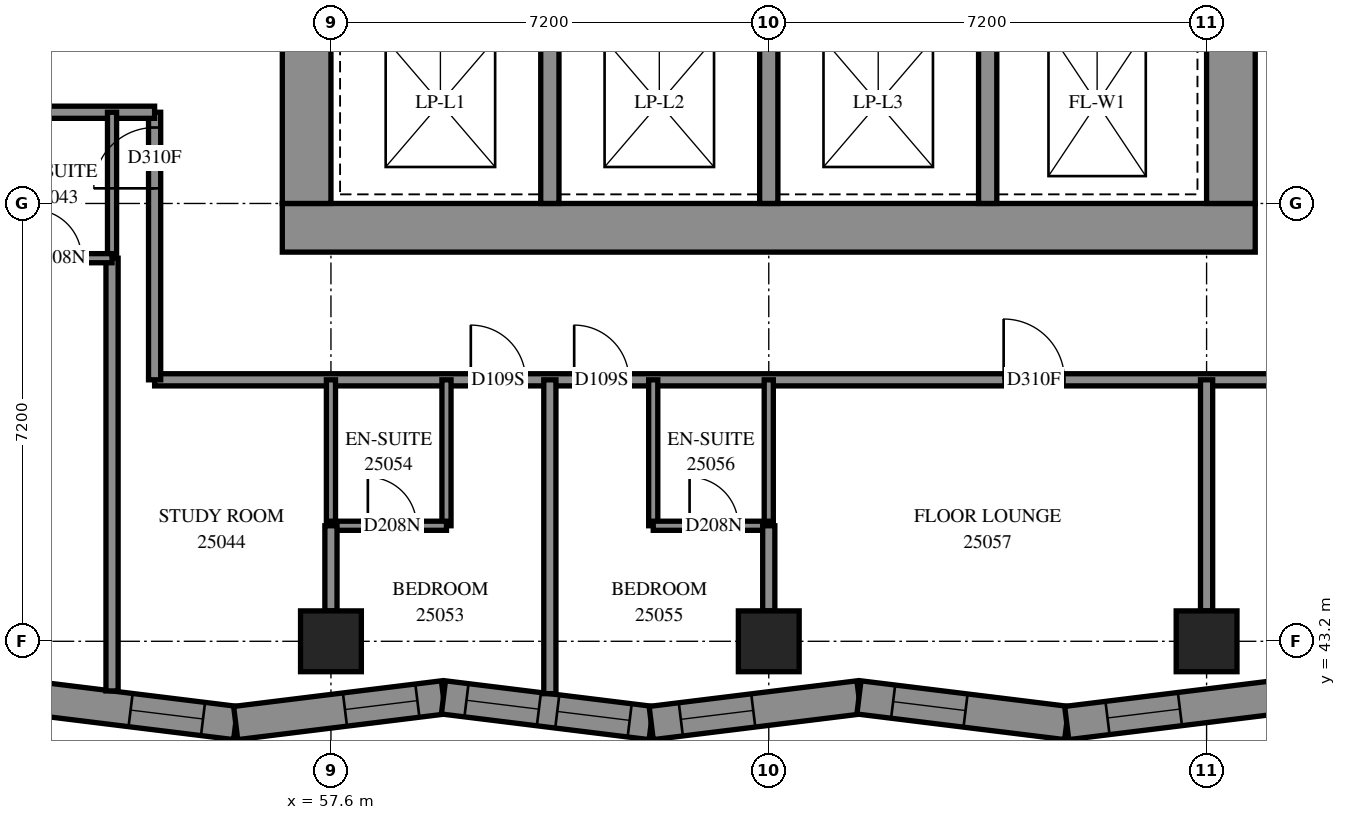
"""IFC4 building model, lengths in metres.
Left out: names, types, materials, properties, quantities, classifications, styles, units other than length and angle.
Written with IfcOpenShell. Run it as: python <this file> out.ifc"""

import sys

from ifc_helpers import new_model, si_unit, direction, frame, frame_2d, origin, origin_2d, place, context, subcontext, project, spatial, polyline, rectangle, outline, extrude, element, fill, save


model = new_model("IFC4")
c1 = context("Model", 3, precision=1e-05, world=origin(), true_north=direction((0.0, 1.0)))
c2 = subcontext(c1, "Body", "Model", "MODEL_VIEW")
j1 = project(units=[si_unit("LENGTHUNIT", "METRE"), si_unit("PLANEANGLEUNIT", "RADIAN")], contexts=[c1])
p1 = place(None, origin())
s1 = spatial("IfcSite", under=j1, at=p1, CompositionType="ELEMENT")
p2 = place(p1, origin())
s2 = spatial("IfcBuilding", under=s1, at=p2, CompositionType="ELEMENT")
p3 = place(p2, frame((0.0, 0.0, 94.8)))
s3 = spatial("IfcBuildingStorey", under=s2, at=p3, CompositionType="ELEMENT", Elevation=94.8)
for number, where, z_axis, x_axis in (
    (1, (57.6, 43.2, 0.0), (0.0, 0.0, 1.0), (1.0, 0.0, 0.0)),
    (2, (64.8, 43.2, 0.0), (0.0, 0.0, 1.0), (1.0, 0.0, 0.0)),
    (3, (72.0, 43.2, 0.0), (0.0, 0.0, 1.0), (1.0, 0.0, 0.0)),
):
    element("IfcColumn", number, at=place(p3, frame(where, z_axis=z_axis, x_axis=x_axis)), inside=s3, PredefinedType="COLUMN", context=c2, shape_type="SweptSolid", body=[
        extrude(rectangle(XDim=1.0, YDim=1.0, at=origin_2d()), origin(), (0.0, 0.0, 1.0), 3.1),
    ])
p4 = place(p3, frame((56.8, 50.0, -0.3), z_axis=(0.0, 0.0, 1.0), x_axis=(1.0, 0.0, 0.0)))
e4 = element("IfcWall", 4, at=p4, inside=s3, PredefinedType="SHEAR", context=c2, shape_type="SweptSolid", body=[
    extrude(rectangle(XDim=16.0, YDim=0.8, at=frame_2d((8.0, 0.0))), origin(), (0.0, 0.0, 1.0), 2.7),
])
p5 = place(p3, frame((57.2, 50.4, -0.3), z_axis=(0.0, 0.0, 1.0), x_axis=(0.0, 1.0, 0.0)))
e5 = element("IfcWall", 5, at=p5, inside=s3, PredefinedType="SHEAR", context=c2, shape_type="SweptSolid", body=[
    extrude(rectangle(XDim=14.4, YDim=0.8, at=frame_2d((7.2, 0.0))), origin(), (0.0, 0.0, 1.0), 2.7),
])
p6 = place(p5, frame((4.55, 0.0, 0.3)))
e6 = element("IfcOpeningElement", 6, at=p6, cuts=e5, PredefinedType="OPENING", context=c2, shape_type="SweptSolid", body=[
    extrude(rectangle(XDim=1.1, YDim=2.1, at=frame_2d((0.55, 1.05))), frame((0.0, 0.41, 0.0), z_axis=(0.0, -1.0, 0.0), x_axis=(1.0, 0.0, 0.0)), (0.0, 0.0, 1.0), 0.82),
])
p7 = place(p5, frame((11.35, 0.0, 0.3)))
e7 = element("IfcOpeningElement", 7, at=p7, cuts=e5, PredefinedType="OPENING", context=c2, shape_type="SweptSolid", body=[
    extrude(rectangle(XDim=1.1, YDim=2.1, at=frame_2d((0.55, 1.05))), frame((0.0, 0.41, 0.0), z_axis=(0.0, -1.0, 0.0), x_axis=(1.0, 0.0, 0.0)), (0.0, 0.0, 1.0), 0.82),
])
p8 = place(p3, frame((72.4, 50.4, -0.3), z_axis=(0.0, 0.0, 1.0), x_axis=(0.0, 1.0, 0.0)))
e8 = element("IfcWall", 8, at=p8, inside=s3, PredefinedType="SHEAR", context=c2, shape_type="SweptSolid", body=[
    extrude(rectangle(XDim=14.4, YDim=0.8, at=frame_2d((7.2, 0.0))), origin(), (0.0, 0.0, 1.0), 2.7),
])
p9 = place(p8, frame((4.55, 0.0, 0.3)))
e9 = element("IfcOpeningElement", 9, at=p9, cuts=e8, PredefinedType="OPENING", context=c2, shape_type="SweptSolid", body=[
    extrude(rectangle(XDim=1.1, YDim=2.1, at=frame_2d((0.55, 1.05))), frame((0.0, 0.41, 0.0), z_axis=(0.0, -1.0, 0.0), x_axis=(1.0, 0.0, 0.0)), (0.0, 0.0, 1.0), 0.82),
])
p10 = place(p8, frame((11.35, 0.0, 0.3)))
e10 = element("IfcOpeningElement", 10, at=p10, cuts=e8, PredefinedType="OPENING", context=c2, shape_type="SweptSolid", body=[
    extrude(rectangle(XDim=1.1, YDim=2.1, at=frame_2d((0.55, 1.05))), frame((0.0, 0.41, 0.0), z_axis=(0.0, -1.0, 0.0), x_axis=(1.0, 0.0, 0.0)), (0.0, 0.0, 1.0), 0.82),
])
for number, where, z_axis, x_axis in (
    (11, (61.2, 50.4, 0.0), (0.0, 0.0, 1.0), (0.0, 1.0, 0.0)),
    (12, (64.8, 50.4, 0.0), (0.0, 0.0, 1.0), (0.0, 1.0, 0.0)),
    (13, (68.4, 50.4, 0.0), (0.0, 0.0, 1.0), (0.0, 1.0, 0.0)),
):
    element("IfcWall", number, at=place(p3, frame(where, z_axis=z_axis, x_axis=x_axis)), inside=s3, PredefinedType="SOLIDWALL", context=c2, shape_type="SweptSolid", body=[
        extrude(rectangle(XDim=3.3, YDim=0.3, at=frame_2d((1.65, 0.0))), origin(), (0.0, 0.0, 1.0), 3.1),
    ])
p11 = place(p3, frame((52.593, 42.28, 0.0), z_axis=(0.0, 0.0, 1.0), x_axis=(0.9924934036, -0.1222981756, 0.0)))
e14 = element("IfcWall", 14, at=p11, inside=s3, PredefinedType="SOLIDWALL", context=c2, shape_type="SweptSolid", body=[
    extrude(outline(polyline([(0.058, -0.275), (3.5, -0.275), (3.432, 0.275), (-0.058, 0.275), (0.058, -0.275)])), origin(), (0.0, 0.0, 1.0), 3.1),
])
p12 = place(p11, frame((1.725, 0.0, 0.5)))
e15 = element("IfcOpeningElement", 15, at=p12, cuts=e14, PredefinedType="OPENING", context=c2, shape_type="SweptSolid", body=[
    extrude(rectangle(XDim=1.2, YDim=2.45, at=frame_2d((0.6, 1.225))), frame((0.0, 0.285, 0.0), z_axis=(0.0, -1.0, 0.0), x_axis=(1.0, 0.0, 0.0)), (0.0, 0.0, 1.0), 0.57),
])
p13 = place(p3, frame((56.033, 41.856, 0.0), z_axis=(0.0, 0.0, 1.0), x_axis=(0.9924939881, 0.122293432, 0.0)))
e16 = element("IfcWall", 16, at=p13, inside=s3, PredefinedType="SOLIDWALL", context=c2, shape_type="SweptSolid", body=[
    extrude(outline(polyline([(-0.034, -0.275), (3.409, -0.275), (3.476, 0.275), (0.034, 0.275), (-0.034, -0.275)])), origin(), (0.0, 0.0, 1.0), 3.1),
])
p14 = place(p13, frame((1.81, 0.0, 0.5)))
e17 = element("IfcOpeningElement", 17, at=p14, cuts=e16, PredefinedType="OPENING", context=c2, shape_type="SweptSolid", body=[
    extrude(rectangle(XDim=1.2, YDim=2.45, at=frame_2d((0.6, 1.225))), frame((0.0, 0.285, 0.0), z_axis=(0.0, -1.0, 0.0), x_axis=(1.0, 0.0, 0.0)), (0.0, 0.0, 1.0), 0.57),
])
p15 = place(p3, frame((59.45, 42.277, 0.0), z_axis=(0.0, 0.0, 1.0), x_axis=(0.9924935537, -0.1222969578, 0.0)))
e18 = element("IfcWall", 18, at=p15, inside=s3, PredefinedType="SOLIDWALL", context=c2, shape_type="SweptSolid", body=[
    extrude(outline(polyline([(0.034, -0.275), (3.476, -0.275), (3.409, 0.275), (-0.034, 0.275), (0.034, -0.275)])), origin(), (0.0, 0.0, 1.0), 3.1),
])
p16 = place(p15, frame((0.382, 0.0, 0.5)))
e19 = element("IfcOpeningElement", 19, at=p16, cuts=e18, PredefinedType="OPENING", context=c2, shape_type="SweptSolid", body=[
    extrude(rectangle(XDim=1.2, YDim=2.45, at=frame_2d((0.6, 1.225))), frame((0.0, 0.285, 0.0), z_axis=(0.0, -1.0, 0.0), x_axis=(1.0, 0.0, 0.0)), (0.0, 0.0, 1.0), 0.57),
])
p17 = place(p15, frame((1.886, 0.0, 0.5)))
e20 = element("IfcOpeningElement", 20, at=p17, cuts=e18, PredefinedType="OPENING", context=c2, shape_type="SweptSolid", body=[
    extrude(rectangle(XDim=1.2, YDim=2.45, at=frame_2d((0.6, 1.225))), frame((0.0, 0.285, 0.0), z_axis=(0.0, -1.0, 0.0), x_axis=(1.0, 0.0, 0.0)), (0.0, 0.0, 1.0), 0.57),
])
p18 = place(p3, frame((62.867, 41.856, 0.0), z_axis=(0.0, 0.0, 1.0), x_axis=(0.9924935537, 0.1222969578, 0.0)))
e21 = element("IfcWall", 21, at=p18, inside=s3, PredefinedType="SOLIDWALL", context=c2, shape_type="SweptSolid", body=[
    extrude(outline(polyline([(-0.034, -0.275), (3.409, -0.275), (3.476, 0.275), (0.034, 0.275), (-0.034, -0.275)])), origin(), (0.0, 0.0, 1.0), 3.1),
])
p19 = place(p18, frame((0.491, 0.0, 0.5)))
e22 = element("IfcOpeningElement", 22, at=p19, cuts=e21, PredefinedType="OPENING", context=c2, shape_type="SweptSolid", body=[
    extrude(rectangle(XDim=1.2, YDim=2.45, at=frame_2d((0.6, 1.225))), frame((0.0, 0.285, 0.0), z_axis=(0.0, -1.0, 0.0), x_axis=(1.0, 0.0, 0.0)), (0.0, 0.0, 1.0), 0.57),
])
p20 = place(p3, frame((66.283, 42.277, 0.0), z_axis=(0.0, 0.0, 1.0), x_axis=(0.9924935537, -0.1222969578, 0.0)))
e23 = element("IfcWall", 23, at=p20, inside=s3, PredefinedType="SOLIDWALL", context=c2, shape_type="SweptSolid", body=[
    extrude(outline(polyline([(0.034, -0.275), (3.476, -0.275), (3.409, 0.275), (-0.034, 0.275), (0.034, -0.275)])), origin(), (0.0, 0.0, 1.0), 3.1),
])
p21 = place(p20, frame((0.566, 0.0, 0.5)))
e24 = element("IfcOpeningElement", 24, at=p21, cuts=e23, PredefinedType="OPENING", context=c2, shape_type="SweptSolid", body=[
    extrude(rectangle(XDim=1.2, YDim=2.45, at=frame_2d((0.6, 1.225))), frame((0.0, 0.285, 0.0), z_axis=(0.0, -1.0, 0.0), x_axis=(1.0, 0.0, 0.0)), (0.0, 0.0, 1.0), 0.57),
])
p22 = place(p3, frame((69.7, 41.856, 0.0), z_axis=(0.0, 0.0, 1.0), x_axis=(0.9924938351, 0.1222946738, 0.0)))
e25 = element("IfcWall", 25, at=p22, inside=s3, PredefinedType="SOLIDWALL", context=c2, shape_type="SweptSolid", body=[
    extrude(outline(polyline([(-0.034, -0.275), (3.409, -0.275), (3.524, 0.275), (0.034, 0.275), (-0.034, -0.275)])), origin(), (0.0, 0.0, 1.0), 3.1),
])
p23 = place(p22, frame((0.676, 0.0, 0.5)))
e26 = element("IfcOpeningElement", 26, at=p23, cuts=e25, PredefinedType="OPENING", context=c2, shape_type="SweptSolid", body=[
    extrude(rectangle(XDim=1.2, YDim=2.45, at=frame_2d((0.6, 1.225))), frame((0.0, 0.285, 0.0), z_axis=(0.0, -1.0, 0.0), x_axis=(1.0, 0.0, 0.0)), (0.0, 0.0, 1.0), 0.57),
])
p24 = place(p3, frame((54.7, 47.5, 0.0), z_axis=(0.0, 0.0, 1.0), x_axis=(1.0, 0.0, 0.0)))
e27 = element("IfcWall", 27, at=p24, inside=s3, PredefinedType="PARTITIONING", context=c2, shape_type="SweptSolid", body=[
    extrude(rectangle(XDim=19.442, YDim=0.2, at=frame_2d((9.721, 0.0))), origin(), (0.0, 0.0, 1.0), 3.1),
])
p25 = place(p24, frame((5.2, 0.0, 0.0)))
e28 = element("IfcOpeningElement", 28, at=p25, cuts=e27, PredefinedType="OPENING", context=c2, shape_type="SweptSolid", body=[
    extrude(rectangle(XDim=0.9, YDim=2.1, at=frame_2d((0.45, 1.05))), frame((0.0, 0.11, 0.0), z_axis=(0.0, -1.0, 0.0), x_axis=(1.0, 0.0, 0.0)), (0.0, 0.0, 1.0), 0.22),
])
p26 = place(p24, frame((6.9, 0.0, 0.0)))
e29 = element("IfcOpeningElement", 29, at=p26, cuts=e27, PredefinedType="OPENING", context=c2, shape_type="SweptSolid", body=[
    extrude(rectangle(XDim=0.9, YDim=2.1, at=frame_2d((0.45, 1.05))), frame((0.0, 0.11, 0.0), z_axis=(0.0, -1.0, 0.0), x_axis=(1.0, 0.0, 0.0)), (0.0, 0.0, 1.0), 0.22),
])
p27 = place(p24, frame((13.963, 0.0, 0.0)))
e30 = element("IfcOpeningElement", 30, at=p27, cuts=e27, PredefinedType="OPENING", context=c2, shape_type="SweptSolid", body=[
    extrude(rectangle(XDim=1.0, YDim=2.1, at=frame_2d((0.5, 1.05))), frame((0.0, 0.11, 0.0), z_axis=(0.0, -1.0, 0.0), x_axis=(1.0, 0.0, 0.0)), (0.0, 0.0, 1.0), 0.22),
])
p28 = place(p3, frame((54.0, 42.384, 0.0), z_axis=(0.0, 0.0, 1.0), x_axis=(0.0, 1.0, 0.0)))
e31 = element("IfcWall", 31, at=p28, inside=s3, PredefinedType="PARTITIONING", context=c2, shape_type="SweptSolid", body=[
    extrude(rectangle(XDim=7.116, YDim=0.2, at=frame_2d((3.558, 0.0))), origin(), (0.0, 0.0, 1.0), 3.1),
])
p29 = place(p3, frame((61.2, 42.339, 0.0), z_axis=(0.0, 0.0, 1.0), x_axis=(0.0, 1.0, 0.0)))
e32 = element("IfcWall", 32, at=p29, inside=s3, PredefinedType="PARTITIONING", context=c2, shape_type="SweptSolid", body=[
    extrude(rectangle(XDim=5.162, YDim=0.2, at=frame_2d((2.581, 0.0))), origin(), (0.0, 0.0, 1.0), 3.1),
])
p30 = place(p3, frame((54.7, 47.5, 0.0), z_axis=(0.0, 0.0, 1.0), x_axis=(0.0, 1.0, 0.0)))
e33 = element("IfcWall", 33, at=p30, inside=s3, PredefinedType="PARTITIONING", context=c2, shape_type="SweptSolid", body=[
    extrude(rectangle(XDim=4.4, YDim=0.2, at=frame_2d((2.2, 0.0))), origin(), (0.0, 0.0, 1.0), 3.1),
])
p31 = place(p30, frame((3.149, 0.0, 0.0)))
e34 = element("IfcOpeningElement", 34, at=p31, cuts=e33, PredefinedType="OPENING", context=c2, shape_type="SweptSolid", body=[
    extrude(rectangle(XDim=1.0, YDim=2.1, at=frame_2d((0.5, 1.05))), frame((0.0, 0.11, 0.0), z_axis=(0.0, -1.0, 0.0), x_axis=(1.0, 0.0, 0.0)), (0.0, 0.0, 1.0), 0.22),
])
p32 = place(p3, frame((50.4, 51.9, 0.0), z_axis=(0.0, 0.0, 1.0), x_axis=(1.0, 0.0, 0.0)))
e35 = element("IfcWall", 35, at=p32, inside=s3, PredefinedType="PARTITIONING", context=c2, shape_type="SweptSolid", body=[
    extrude(rectangle(XDim=4.3, YDim=0.2, at=frame_2d((2.15, 0.0))), origin(), (0.0, 0.0, 1.0), 3.1),
])
p33 = place(p32, frame((0.552, 0.0, 0.0)))
e36 = element("IfcOpeningElement", 36, at=p33, cuts=e35, PredefinedType="OPENING", context=c2, shape_type="SweptSolid", body=[
    extrude(rectangle(XDim=0.9, YDim=2.1, at=frame_2d((0.45, 1.05))), frame((0.0, 0.11, 0.0), z_axis=(0.0, -1.0, 0.0), x_axis=(1.0, 0.0, 0.0)), (0.0, 0.0, 1.0), 0.22),
])
p34 = place(p3, frame((72.0, 43.7, 0.0), z_axis=(0.0, 0.0, 1.0), x_axis=(0.0, 1.0, 0.0)))
e37 = element("IfcWall", 37, at=p34, inside=s3, PredefinedType="PARTITIONING", context=c2, shape_type="SweptSolid", body=[
    extrude(rectangle(XDim=3.8, YDim=0.2, at=frame_2d((1.9, 0.0))), origin(), (0.0, 0.0, 1.0), 3.1),
])
for number, where, z_axis, x_axis in (
    (38, (54.0, 49.5, 0.0), (0.0, 0.0, 1.0), (0.0, 1.0, 0.0)),
    (39, (59.5, 45.1, 0.0), (0.0, 0.0, 1.0), (0.0, 1.0, 0.0)),
    (40, (57.6, 45.1, 0.0), (0.0, 0.0, 1.0), (0.0, 1.0, 0.0)),
    (41, (62.9, 45.1, 0.0), (0.0, 0.0, 1.0), (0.0, 1.0, 0.0)),
    (42, (64.8, 45.1, 0.0), (0.0, 0.0, 1.0), (0.0, 1.0, 0.0)),
):
    element("IfcWall", number, at=place(p3, frame(where, z_axis=z_axis, x_axis=x_axis)), inside=s3, PredefinedType="PARTITIONING", context=c2, shape_type="SweptSolid", body=[
        extrude(rectangle(XDim=2.4, YDim=0.15, at=frame_2d((1.2, 0.0))), origin(), (0.0, 0.0, 1.0), 3.1),
    ])
p35 = place(p3, frame((52.1, 49.5, 0.0), z_axis=(0.0, 0.0, 1.0), x_axis=(1.0, 0.0, 0.0)))
e43 = element("IfcWall", 43, at=p35, inside=s3, PredefinedType="PARTITIONING", context=c2, shape_type="SweptSolid", body=[
    extrude(rectangle(XDim=1.9, YDim=0.15, at=frame_2d((0.95, 0.0))), origin(), (0.0, 0.0, 1.0), 3.1),
])
p36 = place(p35, frame((0.598, 0.0, 0.0)))
e44 = element("IfcOpeningElement", 44, at=p36, cuts=e43, PredefinedType="OPENING", context=c2, shape_type="SweptSolid", body=[
    extrude(rectangle(XDim=0.8, YDim=2.1, at=frame_2d((0.4, 1.05))), frame((0.0, 0.085, 0.0), z_axis=(0.0, -1.0, 0.0), x_axis=(1.0, 0.0, 0.0)), (0.0, 0.0, 1.0), 0.17),
])
p37 = place(p3, frame((57.6, 45.1, 0.0), z_axis=(0.0, 0.0, 1.0), x_axis=(1.0, 0.0, 0.0)))
e45 = element("IfcWall", 45, at=p37, inside=s3, PredefinedType="PARTITIONING", context=c2, shape_type="SweptSolid", body=[
    extrude(rectangle(XDim=1.9, YDim=0.15, at=frame_2d((0.95, 0.0))), origin(), (0.0, 0.0, 1.0), 3.1),
])
p38 = place(p37, frame((0.607, 0.0, 0.0)))
e46 = element("IfcOpeningElement", 46, at=p38, cuts=e45, PredefinedType="OPENING", context=c2, shape_type="SweptSolid", body=[
    extrude(rectangle(XDim=0.8, YDim=2.1, at=frame_2d((0.4, 1.05))), frame((0.0, 0.085, 0.0), z_axis=(0.0, -1.0, 0.0), x_axis=(1.0, 0.0, 0.0)), (0.0, 0.0, 1.0), 0.17),
])
p39 = place(p3, frame((62.9, 45.1, 0.0), z_axis=(0.0, 0.0, 1.0), x_axis=(1.0, 0.0, 0.0)))
e47 = element("IfcWall", 47, at=p39, inside=s3, PredefinedType="PARTITIONING", context=c2, shape_type="SweptSolid", body=[
    extrude(rectangle(XDim=1.9, YDim=0.15, at=frame_2d((0.95, 0.0))), origin(), (0.0, 0.0, 1.0), 3.1),
])
p40 = place(p39, frame((0.598, 0.0, 0.0)))
e48 = element("IfcOpeningElement", 48, at=p40, cuts=e47, PredefinedType="OPENING", context=c2, shape_type="SweptSolid", body=[
    extrude(rectangle(XDim=0.8, YDim=2.1, at=frame_2d((0.4, 1.05))), frame((0.0, 0.085, 0.0), z_axis=(0.0, -1.0, 0.0), x_axis=(1.0, 0.0, 0.0)), (0.0, 0.0, 1.0), 0.17),
])
for number, where, z_axis, x_axis in (
    (49, (57.6, 43.7, 0.0), (0.0, 0.0, 1.0), (0.0, 1.0, 0.0)),
    (50, (64.8, 43.7, 0.0), (0.0, 0.0, 1.0), (0.0, 1.0, 0.0)),
):
    element("IfcWall", number, at=place(p3, frame(where, z_axis=z_axis, x_axis=x_axis)), inside=s3, PredefinedType="PARTITIONING", context=c2, shape_type="SweptSolid", body=[
        extrude(rectangle(XDim=1.4, YDim=0.2, at=frame_2d((0.7, 0.0))), origin(), (0.0, 0.0, 1.0), 3.1),
    ])
p41 = place(p12, origin())
e51 = element("IfcWindow", 51, at=p41, inside=s3, PartitioningType="SINGLE_PANEL", PredefinedType="WINDOW", context=c2, shape_type="SweptSolid", body=[
    extrude(rectangle(XDim=1.2, YDim=2.45, at=frame_2d((0.6, 1.225))), frame((0.0, 0.155, 0.0), z_axis=(0.0, -1.0, 0.0), x_axis=(1.0, 0.0, 0.0)), (0.0, 0.0, 1.0), 0.06),
])
fill(e15, e51)
p42 = place(p14, origin())
e52 = element("IfcWindow", 52, at=p42, inside=s3, PartitioningType="SINGLE_PANEL", PredefinedType="WINDOW", context=c2, shape_type="SweptSolid", body=[
    extrude(rectangle(XDim=1.2, YDim=2.45, at=frame_2d((0.6, 1.225))), frame((0.0, 0.155, 0.0), z_axis=(0.0, -1.0, 0.0), x_axis=(1.0, 0.0, 0.0)), (0.0, 0.0, 1.0), 0.06),
])
fill(e17, e52)
p43 = place(p16, origin())
e53 = element("IfcWindow", 53, at=p43, inside=s3, PartitioningType="SINGLE_PANEL", PredefinedType="WINDOW", context=c2, shape_type="SweptSolid", body=[
    extrude(rectangle(XDim=1.2, YDim=2.45, at=frame_2d((0.6, 1.225))), frame((0.0, 0.155, 0.0), z_axis=(0.0, -1.0, 0.0), x_axis=(1.0, 0.0, 0.0)), (0.0, 0.0, 1.0), 0.06),
])
fill(e19, e53)
p44 = place(p17, origin())
e54 = element("IfcWindow", 54, at=p44, inside=s3, PartitioningType="SINGLE_PANEL", PredefinedType="WINDOW", context=c2, shape_type="SweptSolid", body=[
    extrude(rectangle(XDim=1.2, YDim=2.45, at=frame_2d((0.6, 1.225))), frame((0.0, 0.155, 0.0), z_axis=(0.0, -1.0, 0.0), x_axis=(1.0, 0.0, 0.0)), (0.0, 0.0, 1.0), 0.06),
])
fill(e20, e54)
p45 = place(p19, origin())
e55 = element("IfcWindow", 55, at=p45, inside=s3, PartitioningType="SINGLE_PANEL", PredefinedType="WINDOW", context=c2, shape_type="SweptSolid", body=[
    extrude(rectangle(XDim=1.2, YDim=2.45, at=frame_2d((0.6, 1.225))), frame((0.0, 0.155, 0.0), z_axis=(0.0, -1.0, 0.0), x_axis=(1.0, 0.0, 0.0)), (0.0, 0.0, 1.0), 0.06),
])
fill(e22, e55)
p46 = place(p21, origin())
e56 = element("IfcWindow", 56, at=p46, inside=s3, PartitioningType="SINGLE_PANEL", PredefinedType="WINDOW", context=c2, shape_type="SweptSolid", body=[
    extrude(rectangle(XDim=1.2, YDim=2.45, at=frame_2d((0.6, 1.225))), frame((0.0, 0.155, 0.0), z_axis=(0.0, -1.0, 0.0), x_axis=(1.0, 0.0, 0.0)), (0.0, 0.0, 1.0), 0.06),
])
fill(e24, e56)
p47 = place(p23, origin())
e57 = element("IfcWindow", 57, at=p47, inside=s3, PartitioningType="SINGLE_PANEL", PredefinedType="WINDOW", context=c2, shape_type="SweptSolid", body=[
    extrude(rectangle(XDim=1.2, YDim=2.45, at=frame_2d((0.6, 1.225))), frame((0.0, 0.155, 0.0), z_axis=(0.0, -1.0, 0.0), x_axis=(1.0, 0.0, 0.0)), (0.0, 0.0, 1.0), 0.06),
])
fill(e26, e57)
p48 = place(p36, origin())
e58 = element("IfcDoor", 58, at=p48, inside=s3, OperationType="SINGLE_SWING_RIGHT", PredefinedType="DOOR", context=c2, shape_type="SweptSolid", body=[
    extrude(rectangle(XDim=0.8, YDim=2.1, at=frame_2d((0.4, 1.05))), frame((0.0, 0.025, 0.0), z_axis=(0.0, -1.0, 0.0), x_axis=(1.0, 0.0, 0.0)), (0.0, 0.0, 1.0), 0.05),
])
fill(e44, e58)
p49 = place(p31, origin())
e59 = element("IfcDoor", 59, at=p49, inside=s3, OperationType="SINGLE_SWING_RIGHT", PredefinedType="DOOR", context=c2, shape_type="SweptSolid", body=[
    extrude(rectangle(XDim=1.0, YDim=2.1, at=frame_2d((0.5, 1.05))), frame((0.0, 0.025, 0.0), z_axis=(0.0, -1.0, 0.0), x_axis=(1.0, 0.0, 0.0)), (0.0, 0.0, 1.0), 0.05),
])
fill(e34, e59)
p50 = place(p25, origin())
e60 = element("IfcDoor", 60, at=p50, inside=s3, OperationType="SINGLE_SWING_LEFT", PredefinedType="DOOR", context=c2, shape_type="SweptSolid", body=[
    extrude(rectangle(XDim=0.9, YDim=2.1, at=frame_2d((0.45, 1.05))), frame((0.0, 0.025, 0.0), z_axis=(0.0, -1.0, 0.0), x_axis=(1.0, 0.0, 0.0)), (0.0, 0.0, 1.0), 0.05),
])
fill(e28, e60)
p51 = place(p38, origin())
e61 = element("IfcDoor", 61, at=p51, inside=s3, OperationType="SINGLE_SWING_RIGHT", PredefinedType="DOOR", context=c2, shape_type="SweptSolid", body=[
    extrude(rectangle(XDim=0.8, YDim=2.1, at=frame_2d((0.4, 1.05))), frame((0.0, 0.025, 0.0), z_axis=(0.0, -1.0, 0.0), x_axis=(1.0, 0.0, 0.0)), (0.0, 0.0, 1.0), 0.05),
])
fill(e46, e61)
p52 = place(p26, origin())
e62 = element("IfcDoor", 62, at=p52, inside=s3, OperationType="SINGLE_SWING_RIGHT", PredefinedType="DOOR", context=c2, shape_type="SweptSolid", body=[
    extrude(rectangle(XDim=0.9, YDim=2.1, at=frame_2d((0.45, 1.05))), frame((0.0, 0.025, 0.0), z_axis=(0.0, -1.0, 0.0), x_axis=(1.0, 0.0, 0.0)), (0.0, 0.0, 1.0), 0.05),
])
fill(e29, e62)
p53 = place(p40, origin())
e63 = element("IfcDoor", 63, at=p53, inside=s3, OperationType="SINGLE_SWING_RIGHT", PredefinedType="DOOR", context=c2, shape_type="SweptSolid", body=[
    extrude(rectangle(XDim=0.8, YDim=2.1, at=frame_2d((0.4, 1.05))), frame((0.0, 0.025, 0.0), z_axis=(0.0, -1.0, 0.0), x_axis=(1.0, 0.0, 0.0)), (0.0, 0.0, 1.0), 0.05),
])
fill(e48, e63)
p54 = place(p27, origin())
e64 = element("IfcDoor", 64, at=p54, inside=s3, OperationType="SINGLE_SWING_LEFT", PredefinedType="DOOR", context=c2, shape_type="SweptSolid", body=[
    extrude(rectangle(XDim=1.0, YDim=2.1, at=frame_2d((0.5, 1.05))), frame((0.0, 0.025, 0.0), z_axis=(0.0, -1.0, 0.0), x_axis=(1.0, 0.0, 0.0)), (0.0, 0.0, 1.0), 0.05),
])
fill(e30, e64)
save(model, sys.argv[1])
